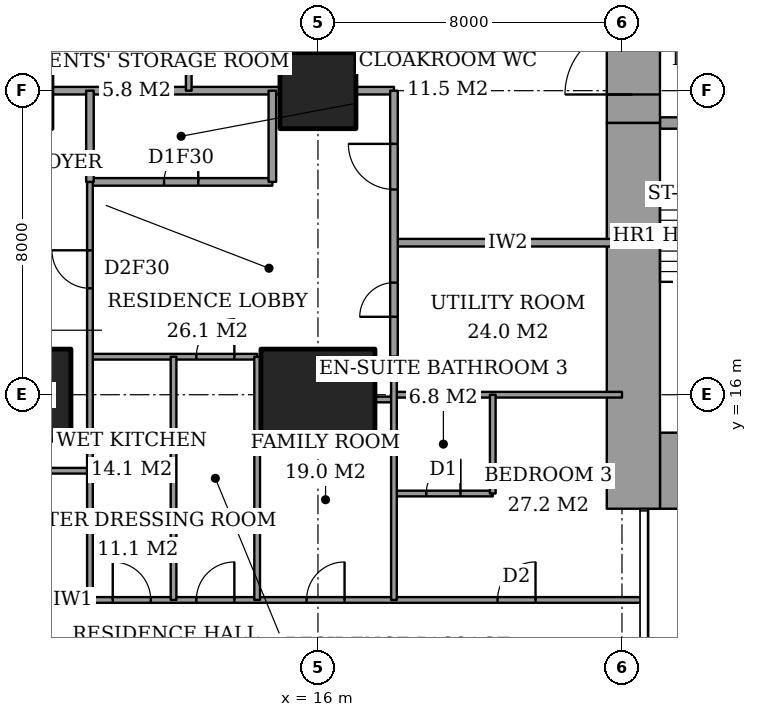
"""IFC4 building model, lengths in metres.
Left out: names, types, materials, properties, quantities, classifications, styles, units other than length and angle.
Written with IfcOpenShell. Run it as: python <this file> out.ifc"""

import sys

from ifc_helpers import new_model, si_unit, direction, frame, frame_2d, origin, origin_2d, place, context, subcontext, project, spatial, rectangle, extrude, element, fill, save


model = new_model("IFC4")
c1 = context("Model", 3, precision=1e-05, world=origin(), true_north=direction((0.0, 1.0)))
c2 = subcontext(c1, "Body", "Model", "MODEL_VIEW")
j1 = project(units=[si_unit("LENGTHUNIT", "METRE"), si_unit("PLANEANGLEUNIT", "RADIAN")], contexts=[c1])
p1 = place(None, origin())
s1 = spatial("IfcSite", under=j1, at=p1, CompositionType="ELEMENT")
p2 = place(p1, origin())
s2 = spatial("IfcBuilding", under=s1, at=p2, CompositionType="ELEMENT")
p3 = place(p2, frame((0.0, 0.0, 36.8)))
s3 = spatial("IfcBuildingStorey", under=s2, at=p3, CompositionType="ELEMENT", Elevation=36.8)
for number, where, z_axis, x_axis in (
    (1, (8.0, 16.0, 0.0), (0.0, 0.0, 1.0), (1.0, 0.0, 0.0)),
    (2, (16.0, 16.0, 0.0), (0.0, 0.0, 1.0), (1.0, 0.0, 0.0)),
):
    element("IfcColumn", number, at=place(p3, frame(where, z_axis=z_axis, x_axis=x_axis)), inside=s3, PredefinedType="COLUMN", context=c2, shape_type="SweptSolid", body=[
        extrude(rectangle(XDim=3.0, YDim=2.4, at=origin_2d()), origin(), (0.0, 0.0, 1.0), 3.6),
    ])
p4 = place(p3, frame((16.0, 24.0, 0.0), z_axis=(0.0, 0.0, 1.0), x_axis=(1.0, 0.0, 0.0)))
e3 = element("IfcColumn", 3, at=p4, inside=s3, PredefinedType="COLUMN", context=c2, shape_type="SweptSolid", body=[
    extrude(rectangle(XDim=2.0, YDim=2.0, at=origin_2d()), origin(), (0.0, 0.0, 1.0), 3.6),
])
p5 = place(p3, frame((25.0, 14.0, 0.0), z_axis=(0.0, 0.0, 1.0), x_axis=(1.0, 0.0, 0.0)))
e4 = element("IfcWall", 4, at=p5, inside=s3, PredefinedType="SHEAR", context=c2, shape_type="SweptSolid", body=[
    extrude(rectangle(XDim=3.15, YDim=2.0, at=frame_2d((1.575, 0.0))), origin(), (0.0, 0.0, 1.0), 3.6),
])
p6 = place(p3, frame((24.3, 13.0, 0.0), z_axis=(0.0, 0.0, 1.0), x_axis=(0.0, 1.0, 0.0)))
e5 = element("IfcWall", 5, at=p6, inside=s3, PredefinedType="SHEAR", context=c2, shape_type="SweptSolid", body=[
    extrude(rectangle(XDim=10.15, YDim=1.4, at=frame_2d((5.075, 0.0))), origin(), (0.0, 0.0, 1.0), 3.6),
])
p7 = place(p3, frame((24.3, 23.15, 0.0), z_axis=(0.0, 0.0, 1.0), x_axis=(0.0, 1.0, 0.0)))
e6 = element("IfcWall", 6, at=p7, inside=s3, PredefinedType="SHEAR", context=c2, shape_type="SweptSolid", body=[
    extrude(rectangle(XDim=11.85, YDim=1.4, at=frame_2d((5.925, 0.0))), origin(), (0.0, 0.0, 1.0), 3.6),
])
p8 = place(p7, frame((0.75, 0.0, 0.0)))
e7 = element("IfcOpeningElement", 7, at=p8, cuts=e6, PredefinedType="OPENING", context=c2, shape_type="SweptSolid", body=[
    extrude(rectangle(XDim=1.8, YDim=2.4, at=frame_2d((0.9, 1.2))), frame((0.0, 0.71, 0.0), z_axis=(0.0, -1.0, 0.0), x_axis=(1.0, 0.0, 0.0)), (0.0, 0.0, 1.0), 1.42),
])
p9 = place(p3, frame((25.0, 23.15, 0.0), z_axis=(0.0, 0.0, 1.0), x_axis=(1.0, 0.0, 0.0)))
e8 = element("IfcWall", 8, at=p9, inside=s3, PredefinedType="SHEAR", context=c2, shape_type="SweptSolid", body=[
    extrude(rectangle(XDim=3.15, YDim=0.3, at=frame_2d((1.575, 0.0))), origin(), (0.0, 0.0, 1.0), 3.6),
])
p10 = place(p9, frame((0.6, 0.0, 0.0)))
e9 = element("IfcOpeningElement", 9, at=p10, cuts=e8, PredefinedType="OPENING", context=c2, shape_type="SweptSolid", body=[
    extrude(rectangle(XDim=1.0, YDim=2.1, at=frame_2d((0.5, 1.05))), frame((0.0, 0.16, 0.0), z_axis=(0.0, -1.0, 0.0), x_axis=(1.0, 0.0, 0.0)), (0.0, 0.0, 1.0), 0.32),
])
p11 = place(p3, frame((-0.45, 10.6, 0.0), z_axis=(0.0, 0.0, 1.0), x_axis=(1.0, 0.0, 0.0)))
e10 = element("IfcWall", 10, at=p11, inside=s3, PredefinedType="PARTITIONING", context=c2, shape_type="SweptSolid", body=[
    extrude(rectangle(XDim=25.011, YDim=0.15, at=frame_2d((12.505, 0.0))), origin(), (0.0, 0.0, 1.0), 3.35),
])
p12 = place(p11, frame((13.25, 0.0, 0.0)))
e11 = element("IfcOpeningElement", 11, at=p12, cuts=e10, PredefinedType="OPENING", context=c2, shape_type="SweptSolid", body=[
    extrude(rectangle(XDim=1.0, YDim=2.1, at=frame_2d((0.5, 1.05))), frame((0.0, 0.085, 0.0), z_axis=(0.0, -1.0, 0.0), x_axis=(1.0, 0.0, 0.0)), (0.0, 0.0, 1.0), 0.17),
])
p13 = place(p11, frame((3.087, 0.0, 0.0)))
e12 = element("IfcOpeningElement", 12, at=p13, cuts=e10, PredefinedType="OPENING", context=c2, shape_type="SweptSolid", body=[
    extrude(rectangle(XDim=1.0, YDim=2.1, at=frame_2d((0.5, 1.05))), frame((0.0, 0.085, 0.0), z_axis=(0.0, -1.0, 0.0), x_axis=(1.0, 0.0, 0.0)), (0.0, 0.0, 1.0), 0.17),
])
p14 = place(p11, frame((11.05, 0.0, 0.0)))
e13 = element("IfcOpeningElement", 13, at=p14, cuts=e10, PredefinedType="OPENING", context=c2, shape_type="SweptSolid", body=[
    extrude(rectangle(XDim=1.0, YDim=2.1, at=frame_2d((0.5, 1.05))), frame((0.0, 0.085, 0.0), z_axis=(0.0, -1.0, 0.0), x_axis=(1.0, 0.0, 0.0)), (0.0, 0.0, 1.0), 0.17),
])
p15 = place(p11, frame((16.15, 0.0, 0.0)))
e14 = element("IfcOpeningElement", 14, at=p15, cuts=e10, PredefinedType="OPENING", context=c2, shape_type="SweptSolid", body=[
    extrude(rectangle(XDim=1.0, YDim=2.1, at=frame_2d((0.5, 1.05))), frame((0.0, 0.085, 0.0), z_axis=(0.0, -1.0, 0.0), x_axis=(1.0, 0.0, 0.0)), (0.0, 0.0, 1.0), 0.17),
])
p16 = place(p11, frame((21.175, 0.0, 0.0)))
e15 = element("IfcOpeningElement", 15, at=p16, cuts=e10, PredefinedType="OPENING", context=c2, shape_type="SweptSolid", body=[
    extrude(rectangle(XDim=1.0, YDim=2.1, at=frame_2d((0.5, 1.05))), frame((0.0, 0.085, 0.0), z_axis=(0.0, -1.0, 0.0), x_axis=(1.0, 0.0, 0.0)), (0.0, 0.0, 1.0), 0.17),
])
p17 = place(p3, frame((18.0, 13.4, 0.0), z_axis=(0.0, 0.0, 1.0), x_axis=(1.0, 0.0, 0.0)))
e16 = element("IfcWall", 16, at=p17, inside=s3, PredefinedType="PARTITIONING", context=c2, shape_type="SweptSolid", body=[
    extrude(rectangle(XDim=2.6, YDim=0.15, at=frame_2d((1.3, 0.0))), origin(), (0.0, 0.0, 1.0), 3.35),
])
p18 = place(p17, frame((0.85, 0.0, 0.0)))
e17 = element("IfcOpeningElement", 17, at=p18, cuts=e16, PredefinedType="OPENING", context=c2, shape_type="SweptSolid", body=[
    extrude(rectangle(XDim=0.9, YDim=2.1, at=frame_2d((0.45, 1.05))), frame((0.0, 0.085, 0.0), z_axis=(0.0, -1.0, 0.0), x_axis=(1.0, 0.0, 0.0)), (0.0, 0.0, 1.0), 0.17),
])
p19 = place(p3, frame((6.725, 14.0, 0.0), z_axis=(0.0, 0.0, 1.0), x_axis=(1.0, 0.0, 0.0)))
e18 = element("IfcWall", 18, at=p19, inside=s3, PredefinedType="PARTITIONING", context=c2, shape_type="SweptSolid", body=[
    extrude(rectangle(XDim=3.275, YDim=0.15, at=frame_2d((1.637, 0.0))), origin(), (0.0, 0.0, 1.0), 3.35),
])
p20 = place(p3, frame((17.5, 15.875, 0.0), z_axis=(0.0, 0.0, 1.0), x_axis=(1.0, 0.0, 0.0)))
e19 = element("IfcWall", 19, at=p20, inside=s3, PredefinedType="PARTITIONING", context=c2, shape_type="SweptSolid", body=[
    extrude(rectangle(XDim=0.5, YDim=0.15, at=frame_2d((0.25, 0.0))), origin(), (0.0, 0.0, 1.0), 2.634),
])
p21 = place(p3, frame((18.0, 16.0, 0.0), z_axis=(0.0, 0.0, 1.0), x_axis=(1.0, 0.0, 0.0)))
e20 = element("IfcWall", 20, at=p21, inside=s3, PredefinedType="PARTITIONING", context=c2, shape_type="SweptSolid", body=[
    extrude(rectangle(XDim=6.0, YDim=0.15, at=frame_2d((3.0, 0.0))), origin(), (0.0, 0.0, 1.0), 2.634),
])
p22 = place(p3, frame((10.0, 17.0, 0.0), z_axis=(0.0, 0.0, 1.0), x_axis=(1.0, 0.0, 0.0)))
e21 = element("IfcWall", 21, at=p22, inside=s3, PredefinedType="PARTITIONING", context=c2, shape_type="SweptSolid", body=[
    extrude(rectangle(XDim=4.4, YDim=0.15, at=frame_2d((2.2, 0.0))), origin(), (0.0, 0.0, 1.0), 3.35),
])
p23 = place(p22, frame((2.8, 0.0, 0.0)))
e22 = element("IfcOpeningElement", 22, at=p23, cuts=e21, PredefinedType="OPENING", context=c2, shape_type="SweptSolid", body=[
    extrude(rectangle(XDim=1.0, YDim=2.1, at=frame_2d((0.5, 1.05))), frame((0.0, 0.085, 0.0), z_axis=(0.0, -1.0, 0.0), x_axis=(1.0, 0.0, 0.0)), (0.0, 0.0, 1.0), 0.17),
])
p24 = place(p3, frame((18.0, 20.0, 0.0), z_axis=(0.0, 0.0, 1.0), x_axis=(1.0, 0.0, 0.0)))
e23 = element("IfcWall", 23, at=p24, inside=s3, PredefinedType="PARTITIONING", context=c2, shape_type="SweptSolid", body=[
    extrude(rectangle(XDim=6.0, YDim=0.2, at=frame_2d((3.0, 0.0))), origin(), (0.0, 0.0, 1.0), 3.35),
])
p25 = place(p3, frame((10.0, 21.6, 0.0), z_axis=(0.0, 0.0, 1.0), x_axis=(1.0, 0.0, 0.0)))
e24 = element("IfcWall", 24, at=p25, inside=s3, PredefinedType="PARTITIONING", context=c2, shape_type="SweptSolid", body=[
    extrude(rectangle(XDim=4.8, YDim=0.2, at=frame_2d((2.4, 0.0))), origin(), (0.0, 0.0, 1.0), 3.35),
])
p26 = place(p25, frame((1.95, 0.0, 0.0)))
e25 = element("IfcOpeningElement", 25, at=p26, cuts=e24, PredefinedType="OPENING", context=c2, shape_type="SweptSolid", body=[
    extrude(rectangle(XDim=0.9, YDim=2.1, at=frame_2d((0.45, 1.05))), frame((0.0, 0.11, 0.0), z_axis=(0.0, -1.0, 0.0), x_axis=(1.0, 0.0, 0.0)), (0.0, 0.0, 1.0), 0.22),
])
p27 = place(p3, frame((9.0, 24.0, 0.0), z_axis=(0.0, 0.0, 1.0), x_axis=(1.0, 0.0, 0.0)))
e26 = element("IfcWall", 26, at=p27, inside=s3, PredefinedType="PARTITIONING", context=c2, shape_type="SweptSolid", body=[
    extrude(rectangle(XDim=6.0, YDim=0.2, at=frame_2d((3.0, 0.0))), origin(), (0.0, 0.0, 1.0), 3.35),
])
p28 = place(p3, frame((17.0, 24.0, 0.0), z_axis=(0.0, 0.0, 1.0), x_axis=(1.0, 0.0, 0.0)))
e27 = element("IfcWall", 27, at=p28, inside=s3, PredefinedType="PARTITIONING", context=c2, shape_type="SweptSolid", body=[
    extrude(rectangle(XDim=1.0, YDim=0.2, at=frame_2d((0.5, 0.0))), origin(), (0.0, 0.0, 1.0), 3.35),
])
p29 = place(p3, frame((10.0, 21.6, 0.0), z_axis=(0.0, 0.0, 1.0), x_axis=(0.0, 1.0, 0.0)))
e28 = element("IfcWall", 28, at=p29, inside=s3, PredefinedType="PARTITIONING", context=c2, shape_type="SweptSolid", body=[
    extrude(rectangle(XDim=2.4, YDim=0.2, at=frame_2d((1.2, 0.0))), origin(), (0.0, 0.0, 1.0), 3.35),
])
p30 = place(p3, frame((10.0, 10.6, 0.0), z_axis=(0.0, 0.0, 1.0), x_axis=(0.0, 1.0, 0.0)))
e29 = element("IfcWall", 29, at=p30, inside=s3, PredefinedType="PARTITIONING", context=c2, shape_type="SweptSolid", body=[
    extrude(rectangle(XDim=11.0, YDim=0.15, at=frame_2d((5.5, 0.0))), origin(), (0.0, 0.0, 1.0), 3.35),
])
p31 = place(p30, frame((8.2, 0.0, 0.0)))
e30 = element("IfcOpeningElement", 30, at=p31, cuts=e29, PredefinedType="OPENING", context=c2, shape_type="SweptSolid", body=[
    extrude(rectangle(XDim=1.0, YDim=2.1, at=frame_2d((0.5, 1.05))), frame((0.0, 0.085, 0.0), z_axis=(0.0, -1.0, 0.0), x_axis=(1.0, 0.0, 0.0)), (0.0, 0.0, 1.0), 0.17),
])
p32 = place(p3, frame((12.2, 10.6, 0.0), z_axis=(0.0, 0.0, 1.0), x_axis=(0.0, 1.0, 0.0)))
e31 = element("IfcWall", 31, at=p32, inside=s3, PredefinedType="PARTITIONING", context=c2, shape_type="SweptSolid", body=[
    extrude(rectangle(XDim=6.4, YDim=0.15, at=frame_2d((3.2, 0.0))), origin(), (0.0, 0.0, 1.0), 3.35),
])
p33 = place(p3, frame((12.6, 24.0, 0.0), z_axis=(0.0, 0.0, 1.0), x_axis=(0.0, 1.0, 0.0)))
e32 = element("IfcWall", 32, at=p33, inside=s3, PredefinedType="PARTITIONING", context=c2, shape_type="SweptSolid", body=[
    extrude(rectangle(XDim=1.6, YDim=0.15, at=frame_2d((0.8, 0.0))), origin(), (0.0, 0.0, 1.0), 3.35),
])
p34 = place(p3, frame((14.4, 10.6, 0.0), z_axis=(0.0, 0.0, 1.0), x_axis=(0.0, 1.0, 0.0)))
e33 = element("IfcWall", 33, at=p34, inside=s3, PredefinedType="PARTITIONING", context=c2, shape_type="SweptSolid", body=[
    extrude(rectangle(XDim=6.4, YDim=0.15, at=frame_2d((3.2, 0.0))), origin(), (0.0, 0.0, 1.0), 3.35),
])
p35 = place(p3, frame((14.8, 21.6, 0.0), z_axis=(0.0, 0.0, 1.0), x_axis=(0.0, 1.0, 0.0)))
e34 = element("IfcWall", 34, at=p35, inside=s3, PredefinedType="PARTITIONING", context=c2, shape_type="SweptSolid", body=[
    extrude(rectangle(XDim=2.4, YDim=0.2, at=frame_2d((1.2, 0.0))), origin(), (0.0, 0.0, 1.0), 3.35),
])
p36 = place(p3, frame((18.0, 17.0, 0.0), z_axis=(0.0, 0.0, 1.0), x_axis=(0.0, 1.0, 0.0)))
e35 = element("IfcWall", 35, at=p36, inside=s3, PredefinedType="PARTITIONING", context=c2, shape_type="SweptSolid", body=[
    extrude(rectangle(XDim=7.0, YDim=0.2, at=frame_2d((3.5, 0.0))), origin(), (0.0, 0.0, 1.0), 3.35),
])
p37 = place(p36, frame((4.4, 0.0, 0.0)))
e36 = element("IfcOpeningElement", 36, at=p37, cuts=e35, PredefinedType="OPENING", context=c2, shape_type="SweptSolid", body=[
    extrude(rectangle(XDim=1.2, YDim=2.4, at=frame_2d((0.6, 1.2))), frame((0.0, 0.11, 0.0), z_axis=(0.0, -1.0, 0.0), x_axis=(1.0, 0.0, 0.0)), (0.0, 0.0, 1.0), 0.22),
])
p38 = place(p36, frame((1.05, 0.0, 0.0)))
e37 = element("IfcOpeningElement", 37, at=p38, cuts=e35, PredefinedType="OPENING", context=c2, shape_type="SweptSolid", body=[
    extrude(rectangle(XDim=0.9, YDim=2.1, at=frame_2d((0.45, 1.05))), frame((0.0, 0.11, 0.0), z_axis=(0.0, -1.0, 0.0), x_axis=(1.0, 0.0, 0.0)), (0.0, 0.0, 1.0), 0.22),
])
p39 = place(p3, frame((18.0, 10.6, 0.0), z_axis=(0.0, 0.0, 1.0), x_axis=(0.0, 1.0, 0.0)))
e38 = element("IfcWall", 38, at=p39, inside=s3, PredefinedType="PARTITIONING", context=c2, shape_type="SweptSolid", body=[
    extrude(rectangle(XDim=6.4, YDim=0.15, at=frame_2d((3.2, 0.0))), origin(), (0.0, 0.0, 1.0), 3.35),
])
p40 = place(p3, frame((20.6, 13.4, 0.0), z_axis=(0.0, 0.0, 1.0), x_axis=(0.0, 1.0, 0.0)))
e39 = element("IfcWall", 39, at=p40, inside=s3, PredefinedType="PARTITIONING", context=c2, shape_type="SweptSolid", body=[
    extrude(rectangle(XDim=2.6, YDim=0.15, at=frame_2d((1.3, 0.0))), origin(), (0.0, 0.0, 1.0), 3.35),
])
p41 = place(p12, origin())
e40 = element("IfcDoor", 40, at=p41, inside=s3, OperationType="SINGLE_SWING_LEFT", PredefinedType="DOOR", context=c2, shape_type="SweptSolid", body=[
    extrude(rectangle(XDim=1.0, YDim=2.1, at=frame_2d((0.5, 1.05))), frame((0.0, 0.025, 0.0), z_axis=(0.0, -1.0, 0.0), x_axis=(1.0, 0.0, 0.0)), (0.0, 0.0, 1.0), 0.05),
])
fill(e11, e40)
p42 = place(p31, origin())
e41 = element("IfcDoor", 41, at=p42, inside=s3, OperationType="SINGLE_SWING_LEFT", PredefinedType="DOOR", context=c2, shape_type="SweptSolid", body=[
    extrude(rectangle(XDim=1.0, YDim=2.1, at=frame_2d((0.5, 1.05))), frame((0.0, 0.025, 0.0), z_axis=(0.0, -1.0, 0.0), x_axis=(1.0, 0.0, 0.0)), (0.0, 0.0, 1.0), 0.05),
])
fill(e30, e41)
p43 = place(p26, origin())
e42 = element("IfcDoor", 42, at=p43, inside=s3, OperationType="SINGLE_SWING_LEFT", PredefinedType="DOOR", context=c2, shape_type="SweptSolid", body=[
    extrude(rectangle(XDim=0.9, YDim=2.1, at=frame_2d((0.45, 1.05))), frame((0.0, 0.025, 0.0), z_axis=(0.0, -1.0, 0.0), x_axis=(1.0, 0.0, 0.0)), (0.0, 0.0, 1.0), 0.05),
])
fill(e25, e42)
p44 = place(p37, origin())
e43 = element("IfcDoor", 43, at=p44, inside=s3, OperationType="SINGLE_SWING_LEFT", PredefinedType="DOOR", context=c2, shape_type="SweptSolid", body=[
    extrude(rectangle(XDim=1.2, YDim=2.4, at=frame_2d((0.6, 1.2))), frame((0.0, 0.025, 0.0), z_axis=(0.0, -1.0, 0.0), x_axis=(1.0, 0.0, 0.0)), (0.0, 0.0, 1.0), 0.05),
])
fill(e36, e43)
p45 = place(p14, origin())
e44 = element("IfcDoor", 44, at=p45, inside=s3, OperationType="SINGLE_SWING_RIGHT", PredefinedType="DOOR", context=c2, shape_type="SweptSolid", body=[
    extrude(rectangle(XDim=1.0, YDim=2.1, at=frame_2d((0.5, 1.05))), frame((0.0, 0.025, 0.0), z_axis=(0.0, -1.0, 0.0), x_axis=(1.0, 0.0, 0.0)), (0.0, 0.0, 1.0), 0.05),
])
fill(e13, e44)
p46 = place(p23, origin())
e45 = element("IfcDoor", 45, at=p46, inside=s3, OperationType="SINGLE_SWING_LEFT", PredefinedType="DOOR", context=c2, shape_type="SweptSolid", body=[
    extrude(rectangle(XDim=1.0, YDim=2.1, at=frame_2d((0.5, 1.05))), frame((0.0, 0.025, 0.0), z_axis=(0.0, -1.0, 0.0), x_axis=(1.0, 0.0, 0.0)), (0.0, 0.0, 1.0), 0.05),
])
fill(e22, e45)
p47 = place(p15, origin())
e46 = element("IfcDoor", 46, at=p47, inside=s3, OperationType="SINGLE_SWING_LEFT", PredefinedType="DOOR", context=c2, shape_type="SweptSolid", body=[
    extrude(rectangle(XDim=1.0, YDim=2.1, at=frame_2d((0.5, 1.05))), frame((0.0, 0.025, 0.0), z_axis=(0.0, -1.0, 0.0), x_axis=(1.0, 0.0, 0.0)), (0.0, 0.0, 1.0), 0.05),
])
fill(e14, e46)
p48 = place(p18, origin())
e47 = element("IfcDoor", 47, at=p48, inside=s3, OperationType="SINGLE_SWING_LEFT", PredefinedType="DOOR", context=c2, shape_type="SweptSolid", body=[
    extrude(rectangle(XDim=0.9, YDim=2.1, at=frame_2d((0.45, 1.05))), frame((0.0, 0.025, 0.0), z_axis=(0.0, -1.0, 0.0), x_axis=(1.0, 0.0, 0.0)), (0.0, 0.0, 1.0), 0.05),
])
fill(e17, e47)
p49 = place(p16, origin())
e48 = element("IfcDoor", 48, at=p49, inside=s3, OperationType="SINGLE_SWING_LEFT", PredefinedType="DOOR", context=c2, shape_type="SweptSolid", body=[
    extrude(rectangle(XDim=1.0, YDim=2.1, at=frame_2d((0.5, 1.05))), frame((0.0, 0.025, 0.0), z_axis=(0.0, -1.0, 0.0), x_axis=(1.0, 0.0, 0.0)), (0.0, 0.0, 1.0), 0.05),
])
fill(e15, e48)
p50 = place(p38, origin())
e49 = element("IfcDoor", 49, at=p50, inside=s3, OperationType="SINGLE_SWING_RIGHT", PredefinedType="DOOR", context=c2, shape_type="SweptSolid", body=[
    extrude(rectangle(XDim=0.9, YDim=2.1, at=frame_2d((0.45, 1.05))), frame((0.0, 0.025, 0.0), z_axis=(0.0, -1.0, 0.0), x_axis=(1.0, 0.0, 0.0)), (0.0, 0.0, 1.0), 0.05),
])
fill(e37, e49)
p51 = place(p8, origin())
e50 = element("IfcDoor", 50, at=p51, inside=s3, OperationType="DOUBLE_DOOR_DOUBLE_SWING", PredefinedType="DOOR", context=c2, shape_type="SweptSolid", body=[
    extrude(rectangle(XDim=1.8, YDim=2.4, at=frame_2d((0.9, 1.2))), frame((0.0, 0.025, 0.0), z_axis=(0.0, -1.0, 0.0), x_axis=(1.0, 0.0, 0.0)), (0.0, 0.0, 1.0), 0.05),
])
fill(e7, e50)
save(model, sys.argv[1])
